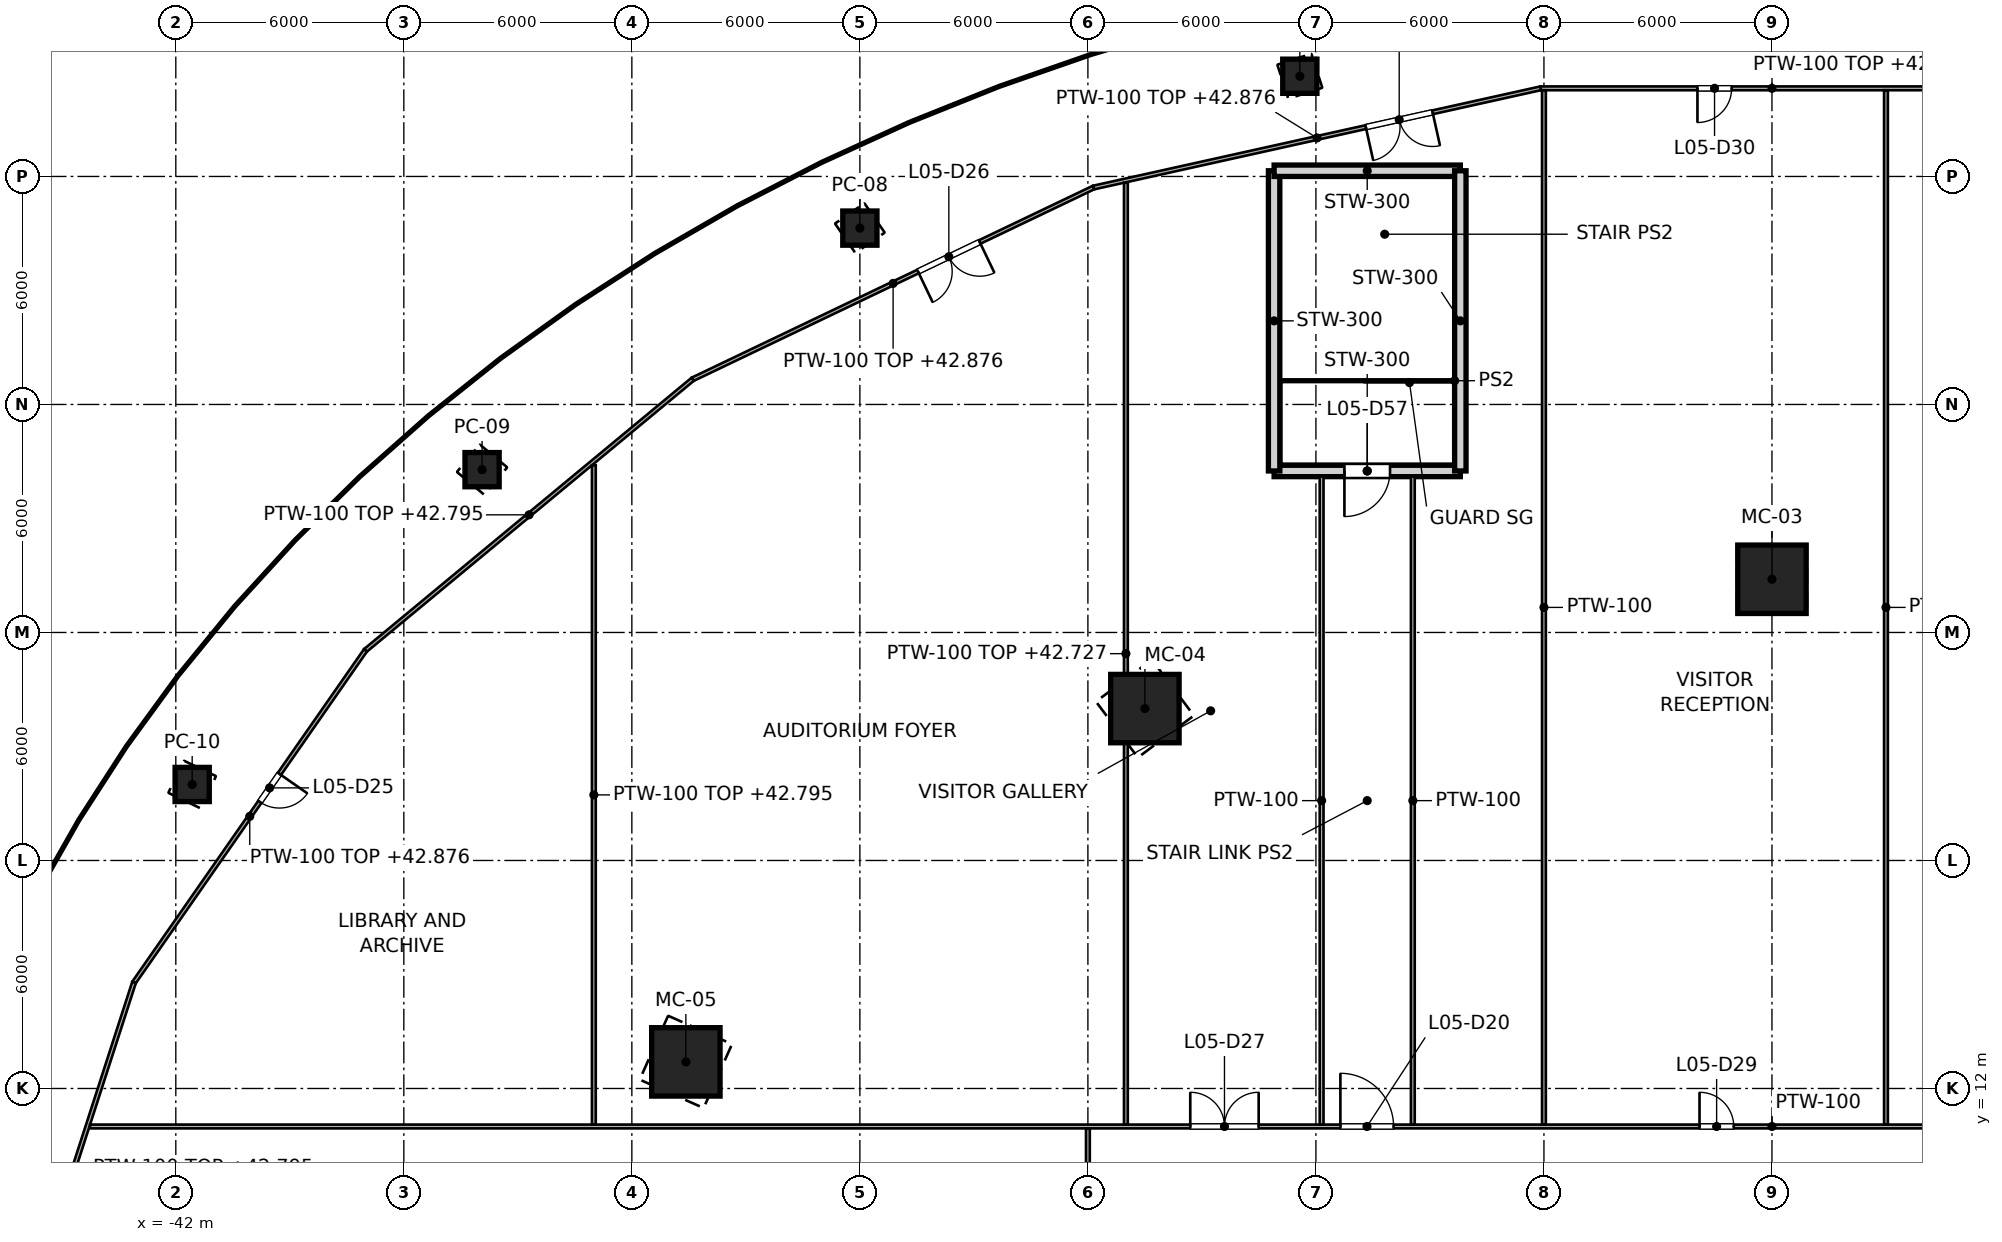
"""IFC4 building model, lengths in metres.
Left out: names, types, materials, properties, quantities, classifications, styles, units other than length and angle.
Written with IfcOpenShell. Run it as: python <this file> out.ifc"""

import sys

from ifc_helpers import new_model, si_unit, direction, frame, frame_2d, origin, origin_2d, place, context, subcontext, project, spatial, rectangle, hollow_rectangle, extrude, element, fill, save


model = new_model("IFC4")
c1 = context("Model", 3, precision=1e-05, world=origin(), true_north=direction((0.0, 1.0)))
c2 = subcontext(c1, "Body", "Model", "MODEL_VIEW")
j1 = project(units=[si_unit("LENGTHUNIT", "METRE"), si_unit("PLANEANGLEUNIT", "RADIAN")], contexts=[c1])
p1 = place(None, origin())
s1 = spatial("IfcSite", under=j1, at=p1, CompositionType="ELEMENT")
p2 = place(p1, origin())
s2 = spatial("IfcBuilding", under=s1, at=p2, CompositionType="ELEMENT")
p3 = place(p2, frame((0.0, 0.0, 37.4)))
s3 = spatial("IfcBuildingStorey", under=s2, at=p3, CompositionType="ELEMENT", Elevation=37.4)
for number, where, z_axis, x_axis in (
    (1, (0.0, 25.4, 0.0), (0.0, 0.0, 1.0), (0.0, 1.0, 0.0)),
    (2, (-16.5, 21.997, 0.0), (0.0, 0.0, 1.0), (-0.6, 0.8, 0.0)),
    (3, (-28.579, 12.7, 0.0), (0.0, 0.0, 1.0), (-0.914, 0.406, 0.0)),
):
    element("IfcColumn", number, at=place(p3, frame(where, z_axis=z_axis, x_axis=x_axis)), inside=s3, PredefinedType="COLUMN", context=c2, shape_type="SweptSolid", body=[
        extrude(hollow_rectangle(XDim=1.8, YDim=1.8, WallThickness=0.08, at=origin_2d()), origin(), (0.0, 0.0, 1.0), 5.9),
    ])
for number, where, z_axis, x_axis in (
    (4, (-12.423, 38.637, 0.0), (0.0, 0.0, 1.0), (-0.306, 0.952, 0.0)),
    (5, (-24.0, 34.641, 0.0), (0.0, 0.0, 1.0), (-0.569, 0.822, 0.0)),
    (6, (-33.941, 28.284, 0.0), (0.0, 0.0, 1.0), (-0.768, 0.64, 0.0)),
    (7, (-41.569, 20.0, 0.0), (0.0, 0.0, 1.0), (-0.901, 0.434, 0.0)),
):
    element("IfcColumn", number, at=place(p3, frame(where, z_axis=z_axis, x_axis=x_axis)), inside=s3, PredefinedType="COLUMN", context=c2, shape_type="SweptSolid", body=[
        extrude(hollow_rectangle(XDim=0.9, YDim=0.9, WallThickness=0.04, at=origin_2d()), origin(), (0.0, 0.0, 1.0), 6.6),
    ])
p4 = place(p3, frame((-8.2, 28.25, 0.0), z_axis=(0.0, 0.0, 1.0), x_axis=(-1.0, 0.0, 0.0)))
e8 = element("IfcWall", 8, at=p4, inside=s3, PredefinedType="SOLIDWALL", context=c2, shape_type="SweptSolid", body=[
    extrude(rectangle(XDim=4.9, YDim=0.3, at=frame_2d((2.45, 0.0))), origin(), (0.0, 0.0, 1.0), 6.25),
])
p5 = place(p4, frame((1.85, 0.0, 0.0)))
e9 = element("IfcOpeningElement", 9, at=p5, cuts=e8, PredefinedType="OPENING", context=c2, shape_type="SweptSolid", body=[
    extrude(rectangle(XDim=1.2, YDim=2.1, at=frame_2d((0.6, 1.05))), frame((0.0, 0.15, 0.0), z_axis=(0.0, -1.0, 0.0), x_axis=(1.0, 0.0, 0.0)), (0.0, 0.0, 1.0), 0.3),
])
p6 = place(p3, frame((-13.1, 28.25, 0.0), z_axis=(0.0, 0.0, 1.0), x_axis=(0.0, 1.0, 0.0)))
e10 = element("IfcWall", 10, at=p6, inside=s3, PredefinedType="SOLIDWALL", context=c2, shape_type="SweptSolid", body=[
    extrude(rectangle(XDim=7.9, YDim=0.3, at=frame_2d((3.95, 0.0))), origin(), (0.0, 0.0, 1.0), 6.25),
])
p7 = place(p3, frame((-13.1, 36.15, 0.0), z_axis=(0.0, 0.0, 1.0), x_axis=(1.0, 0.0, 0.0)))
e11 = element("IfcWall", 11, at=p7, inside=s3, PredefinedType="SOLIDWALL", context=c2, shape_type="SweptSolid", body=[
    extrude(rectangle(XDim=4.9, YDim=0.3, at=frame_2d((2.45, 0.0))), origin(), (0.0, 0.0, 1.0), 6.25),
])
p8 = place(p3, frame((-8.2, 36.15, 0.0), z_axis=(0.0, 0.0, 1.0), x_axis=(0.0, -1.0, 0.0)))
e12 = element("IfcWall", 12, at=p8, inside=s3, PredefinedType="SOLIDWALL", context=c2, shape_type="SweptSolid", body=[
    extrude(rectangle(XDim=7.9, YDim=0.3, at=frame_2d((3.95, 0.0))), origin(), (0.0, 0.0, 1.0), 6.25),
])
p9 = place(p3, frame((6.089, 38.319, 0.0), z_axis=(0.0, 0.0, 1.0), x_axis=(-1.0, 0.0, 0.0)))
e13 = element("IfcWall", 13, at=p9, inside=s3, PredefinedType="PARTITIONING", context=c2, shape_type="SweptSolid", body=[
    extrude(rectangle(XDim=12.178, YDim=0.1, at=frame_2d((6.089, 0.0))), origin(), (0.0, 0.0, 1.0), 5.476),
])
p10 = place(p9, frame((7.15, 0.0, 0.0)))
e14 = element("IfcOpeningElement", 14, at=p10, cuts=e13, PredefinedType="OPENING", context=c2, shape_type="SweptSolid", body=[
    extrude(rectangle(XDim=0.9, YDim=2.1, at=frame_2d((0.45, 1.05))), frame((0.0, 0.05, 0.0), z_axis=(0.0, -1.0, 0.0), x_axis=(1.0, 0.0, 0.0)), (0.0, 0.0, 1.0), 0.1),
])
p11 = place(p3, frame((-6.089, 38.319, 0.0), z_axis=(0.0, 0.0, 1.0), x_axis=(-0.97623471049, -0.216715920124, 0.0)))
e15 = element("IfcWall", 15, at=p11, inside=s3, PredefinedType="PARTITIONING", context=c2, shape_type="SweptSolid", body=[
    extrude(rectangle(XDim=12.05, YDim=0.1, at=frame_2d((6.025, 0.0))), origin(), (0.0, 0.0, 1.0), 5.476),
])
p12 = place(p11, frame((2.91, 0.0, 0.0)))
e16 = element("IfcOpeningElement", 16, at=p12, cuts=e15, PredefinedType="OPENING", context=c2, shape_type="SweptSolid", body=[
    extrude(rectangle(XDim=1.8, YDim=2.1, at=frame_2d((0.9, 1.05))), frame((0.0, 0.05, 0.0), z_axis=(0.0, -1.0, 0.0), x_axis=(1.0, 0.0, 0.0)), (0.0, 0.0, 1.0), 0.1),
])
p13 = place(p3, frame((-17.852, 35.708, 0.0), z_axis=(0.0, 0.0, 1.0), x_axis=(-0.902100999032, -0.431524955878, 0.0)))
e17 = element("IfcWall", 17, at=p13, inside=s3, PredefinedType="PARTITIONING", context=c2, shape_type="SweptSolid", body=[
    extrude(rectangle(XDim=11.691, YDim=0.1, at=frame_2d((5.845, 0.0))), origin(), (0.0, 0.0, 1.0), 5.476),
])
p14 = place(p13, frame((3.32, 0.0, 0.0)))
e18 = element("IfcOpeningElement", 18, at=p14, cuts=e17, PredefinedType="OPENING", context=c2, shape_type="SweptSolid", body=[
    extrude(rectangle(XDim=1.8, YDim=2.1, at=frame_2d((0.9, 1.05))), frame((0.0, 0.05, 0.0), z_axis=(0.0, -1.0, 0.0), x_axis=(1.0, 0.0, 0.0)), (0.0, 0.0, 1.0), 0.1),
])
p15 = place(p3, frame((-28.399, 30.663, 0.0), z_axis=(0.0, 0.0, 1.0), x_axis=(-0.770046995363, -0.637987166746, 0.0)))
e19 = element("IfcWall", 19, at=p15, inside=s3, PredefinedType="PARTITIONING", context=c2, shape_type="SweptSolid", body=[
    extrude(rectangle(XDim=11.183, YDim=0.1, at=frame_2d((5.591, 0.0))), origin(), (0.0, 0.0, 1.0), 5.395),
])
p16 = place(p3, frame((-37.01, 23.529, 0.0), z_axis=(0.0, 0.0, 1.0), x_axis=(-0.571737958261, -0.820436290692, 0.0)))
e20 = element("IfcWall", 20, at=p16, inside=s3, PredefinedType="PARTITIONING", context=c2, shape_type="SweptSolid", body=[
    extrude(rectangle(XDim=10.65, YDim=0.1, at=frame_2d((5.325, 0.0))), origin(), (0.0, 0.0, 1.0), 5.476),
])
p17 = place(p16, frame((3.96, 0.0, 0.0)))
e21 = element("IfcOpeningElement", 21, at=p17, cuts=e20, PredefinedType="OPENING", context=c2, shape_type="SweptSolid", body=[
    extrude(rectangle(XDim=0.9, YDim=2.1, at=frame_2d((0.45, 1.05))), frame((0.0, 0.05, 0.0), z_axis=(0.0, -1.0, 0.0), x_axis=(1.0, 0.0, 0.0)), (0.0, 0.0, 1.0), 0.1),
])
p18 = place(p3, frame((-43.099, 14.791, 0.0), z_axis=(0.0, 0.0, 1.0), x_axis=(-0.307713034182, -0.951479210805, 0.0)))
e22 = element("IfcWall", 22, at=p18, inside=s3, PredefinedType="PARTITIONING", context=c2, shape_type="SweptSolid", body=[
    extrude(rectangle(XDim=10.243, YDim=0.1, at=frame_2d((5.122, 0.0))), origin(), (0.0, 0.0, 1.0), 5.395),
])
p19 = place(p3, frame((-44.256, 11.0, 0.0), z_axis=(0.0, 0.0, 1.0), x_axis=(1.0, 0.0, 0.0)))
e23 = element("IfcWall", 23, at=p19, inside=s3, PredefinedType="PARTITIONING", context=c2, shape_type="SweptSolid", body=[
    extrude(rectangle(XDim=88.512, YDim=0.1, at=frame_2d((44.256, 0.0))), origin(), (0.0, 0.0, 1.0), 5.318),
])
p20 = place(p19, frame((54.2, 0.0, 0.0)))
e24 = element("IfcOpeningElement", 24, at=p20, cuts=e23, PredefinedType="OPENING", context=c2, shape_type="SweptSolid", body=[
    extrude(rectangle(XDim=1.4, YDim=2.1, at=frame_2d((0.7, 1.05))), frame((0.0, 0.05, 0.0), z_axis=(0.0, -1.0, 0.0), x_axis=(1.0, 0.0, 0.0)), (0.0, 0.0, 1.0), 0.1),
])
p21 = place(p19, frame((32.9, 0.0, 0.0)))
e25 = element("IfcOpeningElement", 25, at=p21, cuts=e23, PredefinedType="OPENING", context=c2, shape_type="SweptSolid", body=[
    extrude(rectangle(XDim=1.4, YDim=2.1, at=frame_2d((0.7, 1.05))), frame((0.0, 0.05, 0.0), z_axis=(0.0, -1.0, 0.0), x_axis=(1.0, 0.0, 0.0)), (0.0, 0.0, 1.0), 0.1),
])
p22 = place(p19, frame((28.95, 0.0, 0.0)))
e26 = element("IfcOpeningElement", 26, at=p22, cuts=e23, PredefinedType="OPENING", context=c2, shape_type="SweptSolid", body=[
    extrude(rectangle(XDim=1.8, YDim=2.1, at=frame_2d((0.9, 1.05))), frame((0.0, 0.05, 0.0), z_axis=(0.0, -1.0, 0.0), x_axis=(1.0, 0.0, 0.0)), (0.0, 0.0, 1.0), 0.1),
])
p23 = place(p19, frame((42.35, 0.0, 0.0)))
e27 = element("IfcOpeningElement", 27, at=p23, cuts=e23, PredefinedType="OPENING", context=c2, shape_type="SweptSolid", body=[
    extrude(rectangle(XDim=0.9, YDim=2.1, at=frame_2d((0.45, 1.05))), frame((0.0, 0.05, 0.0), z_axis=(0.0, -1.0, 0.0), x_axis=(1.0, 0.0, 0.0)), (0.0, 0.0, 1.0), 0.1),
])
p24 = place(p19, frame((49.6, 0.0, 0.0)))
e28 = element("IfcOpeningElement", 28, at=p24, cuts=e23, PredefinedType="OPENING", context=c2, shape_type="SweptSolid", body=[
    extrude(rectangle(XDim=1.8, YDim=2.1, at=frame_2d((0.9, 1.05))), frame((0.0, 0.05, 0.0), z_axis=(0.0, -1.0, 0.0), x_axis=(1.0, 0.0, 0.0)), (0.0, 0.0, 1.0), 0.1),
])
p25 = place(p3, frame((-18.0, -10.95, 0.0), z_axis=(0.0, 0.0, 1.0), x_axis=(0.0, 1.0, 0.0)))
e29 = element("IfcWall", 29, at=p25, inside=s3, PredefinedType="PARTITIONING", context=c2, shape_type="SweptSolid", body=[
    extrude(rectangle(XDim=21.9, YDim=0.1, at=frame_2d((10.95, 0.0))), origin(), (0.0, 0.0, 1.0), 5.318),
])
p26 = place(p25, frame((19.75, 0.0, 0.0)))
e30 = element("IfcOpeningElement", 30, at=p26, cuts=e29, PredefinedType="OPENING", context=c2, shape_type="SweptSolid", body=[
    extrude(rectangle(XDim=0.9, YDim=2.1, at=frame_2d((0.45, 1.05))), frame((0.0, 0.05, 0.0), z_axis=(0.0, -1.0, 0.0), x_axis=(1.0, 0.0, 0.0)), (0.0, 0.0, 1.0), 0.1),
])
p27 = place(p25, frame((5.85, 0.0, 0.0)))
e31 = element("IfcOpeningElement", 31, at=p27, cuts=e29, PredefinedType="OPENING", context=c2, shape_type="SweptSolid", body=[
    extrude(rectangle(XDim=0.9, YDim=2.1, at=frame_2d((0.45, 1.05))), frame((0.0, 0.05, 0.0), z_axis=(0.0, -1.0, 0.0), x_axis=(1.0, 0.0, 0.0)), (0.0, 0.0, 1.0), 0.1),
])
p28 = place(p25, frame((10.45, 0.0, 0.0)))
e32 = element("IfcOpeningElement", 32, at=p28, cuts=e29, PredefinedType="OPENING", context=c2, shape_type="SweptSolid", body=[
    extrude(rectangle(XDim=0.9, YDim=2.1, at=frame_2d((0.45, 1.05))), frame((0.0, 0.05, 0.0), z_axis=(0.0, -1.0, 0.0), x_axis=(1.0, 0.0, 0.0)), (0.0, 0.0, 1.0), 0.1),
])
p29 = place(p25, frame((15.05, 0.0, 0.0)))
e33 = element("IfcOpeningElement", 33, at=p29, cuts=e29, PredefinedType="OPENING", context=c2, shape_type="SweptSolid", body=[
    extrude(rectangle(XDim=0.9, YDim=2.1, at=frame_2d((0.45, 1.05))), frame((0.0, 0.05, 0.0), z_axis=(0.0, -1.0, 0.0), x_axis=(1.0, 0.0, 0.0)), (0.0, 0.0, 1.0), 0.1),
])
p30 = place(p3, frame((-31.0, 11.05, 0.0), z_axis=(0.0, 0.0, 1.0), x_axis=(0.0, 1.0, 0.0)))
e34 = element("IfcWall", 34, at=p30, inside=s3, PredefinedType="PARTITIONING", context=c2, shape_type="SweptSolid", body=[
    extrude(rectangle(XDim=17.352, YDim=0.1, at=frame_2d((8.676, 0.0))), origin(), (0.0, 0.0, 1.0), 5.395),
])
p31 = place(p3, frame((-17.0, 11.05, 0.0), z_axis=(0.0, 0.0, 1.0), x_axis=(0.0, 1.0, 0.0)))
e35 = element("IfcWall", 35, at=p31, inside=s3, PredefinedType="PARTITIONING", context=c2, shape_type="SweptSolid", body=[
    extrude(rectangle(XDim=24.785, YDim=0.1, at=frame_2d((12.392, 0.0))), origin(), (0.0, 0.0, 1.0), 5.327),
])
for number, where, z_axis, x_axis in (
    (36, (-6.0, 11.05, 0.0), (0.0, 0.0, 1.0), (0.0, 1.0, 0.0)),
    (37, (3.0, 11.05, 0.0), (0.0, 0.0, 1.0), (0.0, 1.0, 0.0)),
):
    element("IfcWall", number, at=place(p3, frame(where, z_axis=z_axis, x_axis=x_axis)), inside=s3, PredefinedType="PARTITIONING", context=c2, shape_type="SweptSolid", body=[
        extrude(rectangle(XDim=27.219, YDim=0.1, at=frame_2d((13.61, 0.0))), origin(), (0.0, 0.0, 1.0), 5.318),
    ])
for number, where, z_axis, x_axis in (
    (38, (-11.85, 11.05, 0.0), (0.0, 0.0, 1.0), (0.0, 1.0, 0.0)),
    (39, (-9.45, 11.05, 0.0), (0.0, 0.0, 1.0), (0.0, 1.0, 0.0)),
):
    element("IfcWall", number, at=place(p3, frame(where, z_axis=z_axis, x_axis=x_axis)), inside=s3, PredefinedType="PARTITIONING", context=c2, shape_type="SweptSolid", body=[
        extrude(rectangle(XDim=17.05, YDim=0.1, at=frame_2d((8.525, 0.0))), origin(), (0.0, 0.0, 1.0), 5.318),
    ])
p32 = place(p21, origin())
e40 = element("IfcDoor", 40, at=p32, inside=s3, OperationType="SINGLE_SWING_LEFT", PredefinedType="DOOR", context=c2, shape_type="SweptSolid", body=[
    extrude(rectangle(XDim=1.4, YDim=2.1, at=frame_2d((0.7, 1.05))), frame((0.0, 0.025, 0.0), z_axis=(0.0, -1.0, 0.0), x_axis=(1.0, 0.0, 0.0)), (0.0, 0.0, 1.0), 0.05),
])
fill(e25, e40)
p33 = place(p17, origin())
e41 = element("IfcDoor", 41, at=p33, inside=s3, OperationType="SINGLE_SWING_LEFT", PredefinedType="DOOR", context=c2, shape_type="SweptSolid", body=[
    extrude(rectangle(XDim=0.9, YDim=2.1, at=frame_2d((0.45, 1.05))), frame((0.0, 0.025, 0.0), z_axis=(0.0, -1.0, 0.0), x_axis=(1.0, 0.0, 0.0)), (0.0, 0.0, 1.0), 0.05),
])
fill(e21, e41)
p34 = place(p14, origin())
e42 = element("IfcDoor", 42, at=p34, inside=s3, OperationType="DOUBLE_DOOR_SINGLE_SWING", PredefinedType="DOOR", context=c2, shape_type="SweptSolid", body=[
    extrude(rectangle(XDim=1.8, YDim=2.1, at=frame_2d((0.9, 1.05))), frame((0.0, 0.025, 0.0), z_axis=(0.0, -1.0, 0.0), x_axis=(1.0, 0.0, 0.0)), (0.0, 0.0, 1.0), 0.05),
])
fill(e18, e42)
p35 = place(p22, origin())
e43 = element("IfcDoor", 43, at=p35, inside=s3, OperationType="DOUBLE_DOOR_SINGLE_SWING", PredefinedType="DOOR", context=c2, shape_type="SweptSolid", body=[
    extrude(rectangle(XDim=1.8, YDim=2.1, at=frame_2d((0.9, 1.05))), frame((0.0, 0.025, 0.0), z_axis=(0.0, -1.0, 0.0), x_axis=(1.0, 0.0, 0.0)), (0.0, 0.0, 1.0), 0.05),
])
fill(e26, e43)
p36 = place(p12, origin())
e44 = element("IfcDoor", 44, at=p36, inside=s3, OperationType="DOUBLE_DOOR_SINGLE_SWING", PredefinedType="DOOR", context=c2, shape_type="SweptSolid", body=[
    extrude(rectangle(XDim=1.8, YDim=2.1, at=frame_2d((0.9, 1.05))), frame((0.0, 0.025, 0.0), z_axis=(0.0, -1.0, 0.0), x_axis=(1.0, 0.0, 0.0)), (0.0, 0.0, 1.0), 0.05),
])
fill(e16, e44)
p37 = place(p23, origin())
e45 = element("IfcDoor", 45, at=p37, inside=s3, OperationType="SINGLE_SWING_LEFT", PredefinedType="DOOR", context=c2, shape_type="SweptSolid", body=[
    extrude(rectangle(XDim=0.9, YDim=2.1, at=frame_2d((0.45, 1.05))), frame((0.0, 0.025, 0.0), z_axis=(0.0, -1.0, 0.0), x_axis=(1.0, 0.0, 0.0)), (0.0, 0.0, 1.0), 0.05),
])
fill(e27, e45)
p38 = place(p10, origin())
e46 = element("IfcDoor", 46, at=p38, inside=s3, OperationType="SINGLE_SWING_RIGHT", PredefinedType="DOOR", context=c2, shape_type="SweptSolid", body=[
    extrude(rectangle(XDim=0.9, YDim=2.1, at=frame_2d((0.45, 1.05))), frame((0.0, 0.025, 0.0), z_axis=(0.0, -1.0, 0.0), x_axis=(1.0, 0.0, 0.0)), (0.0, 0.0, 1.0), 0.05),
])
fill(e14, e46)
p39 = place(p5, origin())
e47 = element("IfcDoor", 47, at=p39, inside=s3, OperationType="SINGLE_SWING_RIGHT", PredefinedType="DOOR", context=c2, shape_type="SweptSolid", body=[
    extrude(rectangle(XDim=1.2, YDim=2.1, at=frame_2d((0.6, 1.05))), frame((0.0, 0.025, 0.0), z_axis=(0.0, -1.0, 0.0), x_axis=(1.0, 0.0, 0.0)), (0.0, 0.0, 1.0), 0.05),
])
fill(e9, e47)
save(model, sys.argv[1])
